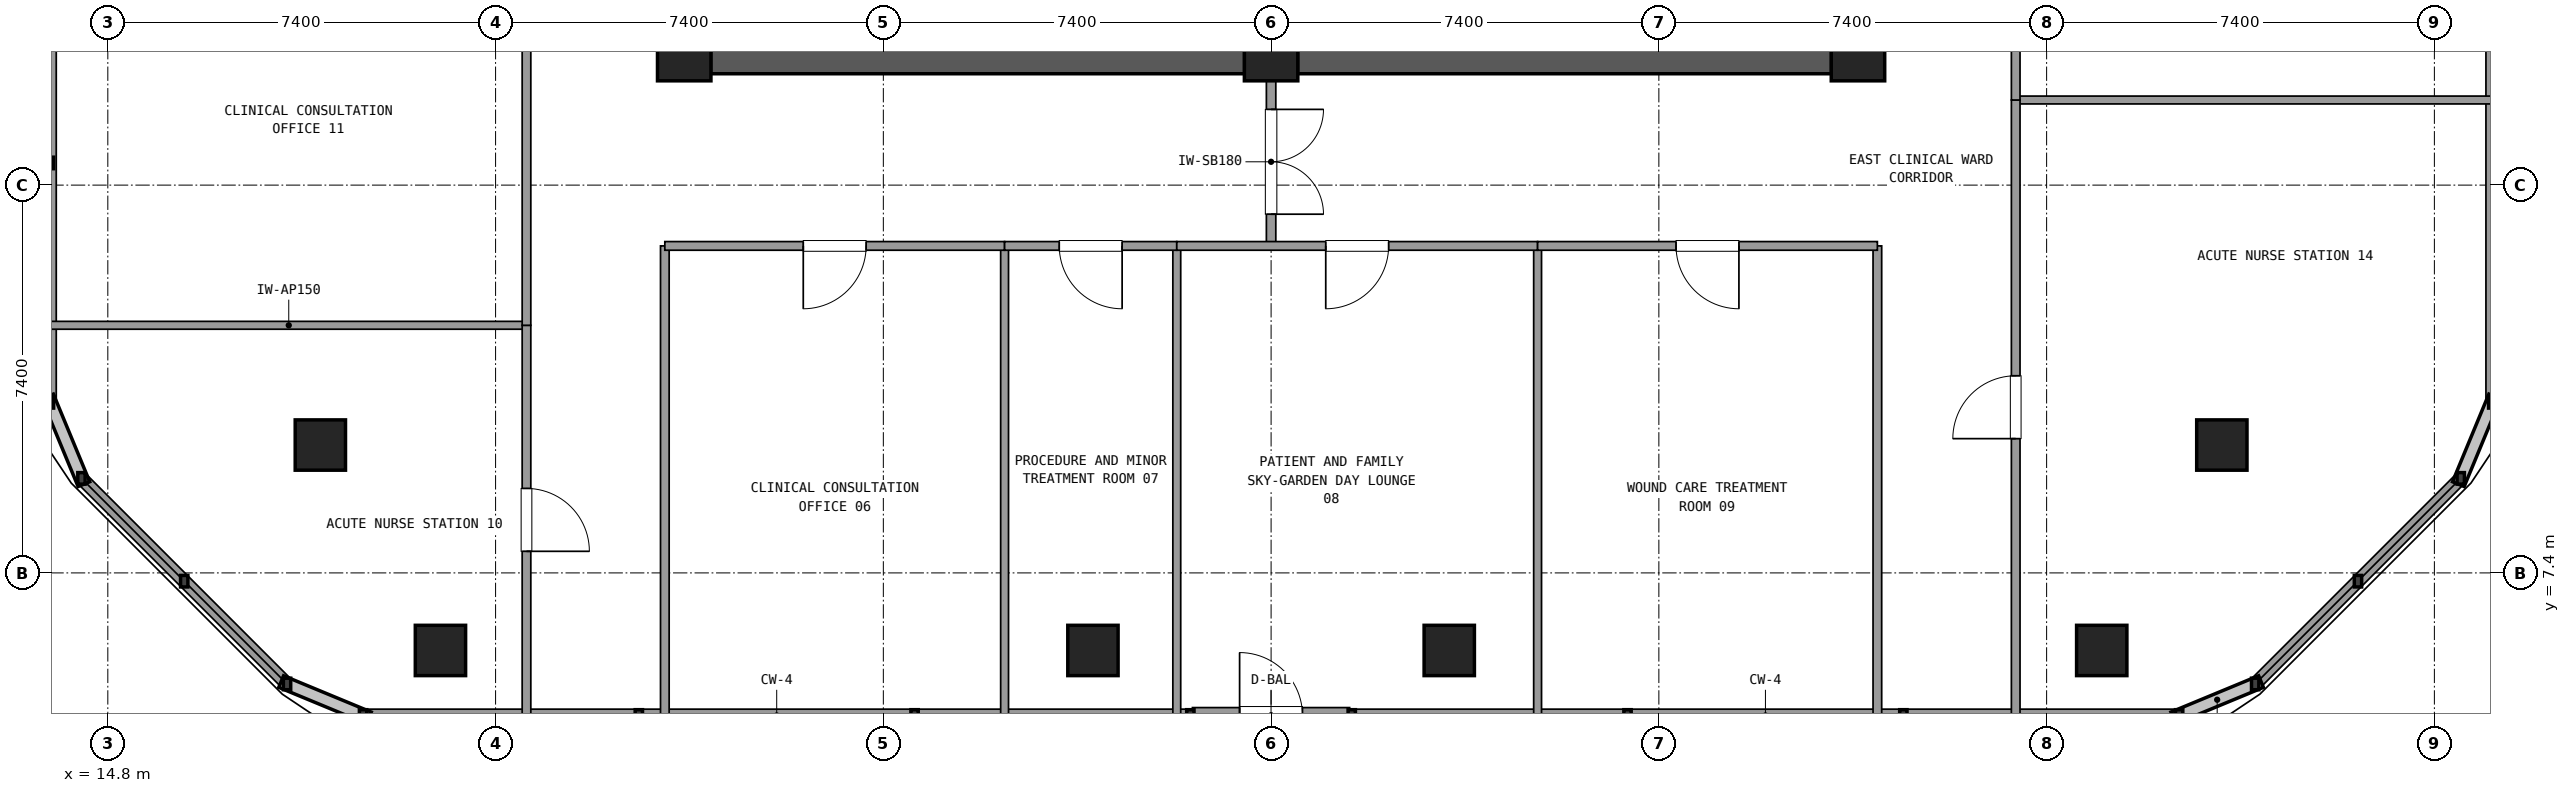
"""IFC4 building model, lengths in metres.
Left out: names, types, materials, properties, quantities, classifications, styles, units other than length and angle.
Written with IfcOpenShell. Run it as: python <this file> out.ifc"""

import sys

from ifc_helpers import new_model, si_unit, direction, frame, frame_2d, origin, origin_2d, place, context, subcontext, project, spatial, rectangle, extrude, element, fill, save


model = new_model("IFC4")
c1 = context("Model", 3, precision=1e-05, world=origin(), true_north=direction((0.0, 1.0)))
c2 = subcontext(c1, "Body", "Model", "MODEL_VIEW")
j1 = project(units=[si_unit("LENGTHUNIT", "METRE"), si_unit("PLANEANGLEUNIT", "RADIAN")], contexts=[c1])
p1 = place(None, origin())
s1 = spatial("IfcSite", under=j1, at=p1, CompositionType="ELEMENT")
p2 = place(p1, origin())
s2 = spatial("IfcBuilding", under=s1, at=p2, CompositionType="ELEMENT")
p3 = place(p2, frame((0.0, 0.0, 134.82)))
s3 = spatial("IfcBuildingStorey", under=s2, at=p3, CompositionType="ELEMENT", Elevation=134.82)
for number, where, z_axis, x_axis in (
    (1, (25.8, 17.3, 0.0), (0.0, 0.0, 1.0), (1.0, 0.0, 0.0)),
    (2, (37.0, 17.3, 0.0), (0.0, 0.0, 1.0), (1.0, 0.0, 0.0)),
    (3, (48.2, 17.3, 0.0), (0.0, 0.0, 1.0), (1.0, 0.0, 0.0)),
):
    element("IfcColumn", number, at=place(p3, frame(where, z_axis=z_axis, x_axis=x_axis)), inside=s3, PredefinedType="COLUMN", context=c2, shape_type="SweptSolid", body=[
        extrude(rectangle(XDim=1.02, YDim=1.02, at=origin_2d()), origin(), (0.0, 0.0, 1.0), 3.6),
    ])
for number, where, z_axis, x_axis in (
    (4, (26.305, 17.3, 0.0), (0.0, 0.0, 1.0), (1.0, 0.0, 0.0)),
    (5, (37.505, 17.3, 0.0), (0.0, 0.0, 1.0), (1.0, 0.0, 0.0)),
):
    element("IfcWall", number, at=place(p3, frame(where, z_axis=z_axis, x_axis=x_axis)), inside=s3, PredefinedType="SHEAR", context=c2, shape_type="SweptSolid", body=[
        extrude(rectangle(XDim=10.19, YDim=0.75, at=frame_2d((5.095, 0.0))), origin(), (0.0, 0.0, 1.0), 3.32),
    ])
for number, where, z_axis, x_axis in (
    (6, (18.856, 9.84, 0.0), (0.0, 0.0, 1.0), (1.0, 0.0, 0.0)),
    (7, (21.148, 5.92, 0.0), (0.0, 0.0, 1.0), (1.0, 0.0, 0.0)),
    (8, (33.6, 5.92, 0.0), (0.0, 0.0, 1.0), (1.0, 0.0, 0.0)),
    (9, (40.4, 5.92, 0.0), (0.0, 0.0, 1.0), (1.0, 0.0, 0.0)),
    (10, (52.852, 5.92, 0.0), (0.0, 0.0, 1.0), (1.0, 0.0, 0.0)),
    (11, (55.144, 9.84, 0.0), (0.0, 0.0, 1.0), (1.0, 0.0, 0.0)),
):
    element("IfcColumn", number, at=place(p3, frame(where, z_axis=z_axis, x_axis=x_axis)), inside=s3, PredefinedType="COLUMN", context=c2, shape_type="SweptSolid", body=[
        extrude(rectangle(XDim=0.96, YDim=0.96, at=origin_2d()), origin(), (0.0, 0.0, 1.0), 3.6),
    ])
p4 = place(p3, frame((35.499, 4.68, 0.0), z_axis=(0.0, 0.0, 1.0), x_axis=(1.0, 0.0, 0.0)))
e12 = element("IfcWall", 12, at=p4, inside=s3, PredefinedType="SOLIDWALL", context=c2, shape_type="SweptSolid", body=[
    extrude(rectangle(XDim=3.0, YDim=0.3, at=frame_2d((1.5, 0.0))), origin(), (0.0, 0.0, 1.0), 2.67),
])
p5 = place(p4, frame((0.9, 0.0, 0.0)))
e13 = element("IfcOpeningElement", 13, at=p5, cuts=e12, PredefinedType="OPENING", context=c2, shape_type="SweptSolid", body=[
    extrude(rectangle(XDim=1.2, YDim=2.2, at=frame_2d((0.6, 1.1))), frame((0.0, 0.16, 0.0), z_axis=(0.0, -1.0, 0.0), x_axis=(1.0, 0.0, 0.0)), (0.0, 0.0, 1.0), 0.32),
])
p6 = place(p3, frame((19.671, 4.68, 0.0), z_axis=(0.0, 0.0, 1.0), x_axis=(1.0, 0.0, 0.0)))
e14 = element("IfcWall", 14, at=p6, inside=s3, PredefinedType="SOLIDWALL", context=c2, shape_type="SweptSolid", body=[
    extrude(rectangle(XDim=15.788, YDim=0.24, at=frame_2d((7.894, 0.0))), origin(), (0.0, 0.0, 1.0), 0.85),
])
p7 = place(p3, frame((38.539, 4.68, 0.0), z_axis=(0.0, 0.0, 1.0), x_axis=(1.0, 0.0, 0.0)))
e15 = element("IfcWall", 15, at=p7, inside=s3, PredefinedType="SOLIDWALL", context=c2, shape_type="SweptSolid", body=[
    extrude(rectangle(XDim=15.79, YDim=0.24, at=frame_2d((7.895, 0.0))), origin(), (0.0, 0.0, 1.0), 0.85),
])
p8 = place(p3, frame((55.78, 5.281, 0.0), z_axis=(0.0, 0.0, 1.0), x_axis=(0.707084777957, 0.707128783731, 0.0)))
e16 = element("IfcWall", 16, at=p8, inside=s3, PredefinedType="SOLIDWALL", context=c2, shape_type="SweptSolid", body=[
    extrude(rectangle(XDim=5.548, YDim=0.24, at=frame_2d((2.774, 0.0))), origin(), (0.0, 0.0, 1.0), 0.85),
])
p9 = place(p3, frame((60.304, 10.655, 0.0), z_axis=(0.0, 0.0, 1.0), x_axis=(0.0, 1.0, 0.0)))
e17 = element("IfcWall", 17, at=p9, inside=s3, PredefinedType="SOLIDWALL", context=c2, shape_type="SweptSolid", body=[
    extrude(rectangle(XDim=30.49, YDim=0.24, at=frame_2d((15.245, 0.0))), origin(), (0.0, 0.0, 1.0), 0.85),
])
p10 = place(p3, frame((13.696, 24.36, 0.0), z_axis=(0.0, 0.0, 1.0), x_axis=(0.0, -1.0, 0.0)))
e18 = element("IfcWall", 18, at=p10, inside=s3, PredefinedType="SOLIDWALL", context=c2, shape_type="SweptSolid", body=[
    extrude(rectangle(XDim=13.705, YDim=0.24, at=frame_2d((6.853, 0.0))), origin(), (0.0, 0.0, 1.0), 0.85),
])
p11 = place(p3, frame((14.297, 9.204, 0.0), z_axis=(0.0, 0.0, 1.0), x_axis=(0.707084777957, -0.707128783731, 0.0)))
e19 = element("IfcWall", 19, at=p11, inside=s3, PredefinedType="SOLIDWALL", context=c2, shape_type="SweptSolid", body=[
    extrude(rectangle(XDim=5.548, YDim=0.24, at=frame_2d((2.774, 0.0))), origin(), (0.0, 0.0, 1.0), 0.85),
])
p12 = place(p3, frame((37.0, 13.64, 0.0), z_axis=(0.0, 0.0, 1.0), x_axis=(0.0, 1.0, 0.0)))
e20 = element("IfcWall", 20, at=p12, inside=s3, PredefinedType="PARTITIONING", context=c2, shape_type="SweptSolid", body=[
    extrude(rectangle(XDim=3.21, YDim=0.18, at=frame_2d((1.605, 0.0))), origin(), (0.0, 0.0, 1.0), 2.61),
])
p13 = place(p12, frame((0.605, 0.0, 0.0)))
e21 = element("IfcOpeningElement", 21, at=p13, cuts=e20, PredefinedType="OPENING", context=c2, shape_type="SweptSolid", body=[
    extrude(rectangle(XDim=2.0, YDim=2.2, at=frame_2d((1.0, 1.1))), frame((0.0, 0.1, 0.0), z_axis=(0.0, -1.0, 0.0), x_axis=(1.0, 0.0, 0.0)), (0.0, 0.0, 1.0), 0.2),
])
for number, where, z_axis, x_axis in (
    (22, (25.43, 4.7, 0.0), (0.0, 0.0, 1.0), (0.0, 1.0, 0.0)),
    (23, (48.57, 4.7, 0.0), (0.0, 0.0, 1.0), (0.0, 1.0, 0.0)),
):
    element("IfcWall", number, at=place(p3, frame(where, z_axis=z_axis, x_axis=x_axis)), inside=s3, PredefinedType="PARTITIONING", context=c2, shape_type="SweptSolid", body=[
        extrude(rectangle(XDim=8.94, YDim=0.165, at=frame_2d((4.47, 0.0))), origin(), (0.0, 0.0, 1.0), 2.61),
    ])
p14 = place(p3, frame((31.914, 13.64, 0.0), z_axis=(0.0, 0.0, 1.0), x_axis=(0.0, -1.0, 0.0)))
e24 = element("IfcWall", 24, at=p14, inside=s3, PredefinedType="PARTITIONING", context=c2, shape_type="SweptSolid", body=[
    extrude(rectangle(XDim=8.94, YDim=0.15, at=frame_2d((4.47, 0.0))), origin(), (0.0, 0.0, 1.0), 2.61),
])
p15 = place(p3, frame((25.43, 13.64, 0.0), z_axis=(0.0, 0.0, 1.0), x_axis=(1.0, 0.0, 0.0)))
e25 = element("IfcWall", 25, at=p15, inside=s3, PredefinedType="PARTITIONING", context=c2, shape_type="SweptSolid", body=[
    extrude(rectangle(XDim=6.484, YDim=0.165, at=frame_2d((3.242, 0.0))), origin(), (0.0, 0.0, 1.0), 2.61),
])
p16 = place(p15, frame((2.642, 0.0, 0.0)))
e26 = element("IfcOpeningElement", 26, at=p16, cuts=e25, PredefinedType="OPENING", context=c2, shape_type="SweptSolid", body=[
    extrude(rectangle(XDim=1.2, YDim=2.15, at=frame_2d((0.6, 1.075))), frame((0.0, 0.093, 0.0), z_axis=(0.0, -1.0, 0.0), x_axis=(1.0, 0.0, 0.0)), (0.0, 0.0, 1.0), 0.185),
])
p17 = place(p3, frame((35.2, 13.64, 0.0), z_axis=(0.0, 0.0, 1.0), x_axis=(0.0, -1.0, 0.0)))
e27 = element("IfcWall", 27, at=p17, inside=s3, PredefinedType="PARTITIONING", context=c2, shape_type="SweptSolid", body=[
    extrude(rectangle(XDim=8.94, YDim=0.15, at=frame_2d((4.47, 0.0))), origin(), (0.0, 0.0, 1.0), 2.61),
])
p18 = place(p3, frame((31.914, 13.64, 0.0), z_axis=(0.0, 0.0, 1.0), x_axis=(1.0, 0.0, 0.0)))
e28 = element("IfcWall", 28, at=p18, inside=s3, PredefinedType="PARTITIONING", context=c2, shape_type="SweptSolid", body=[
    extrude(rectangle(XDim=3.286, YDim=0.165, at=frame_2d((1.643, 0.0))), origin(), (0.0, 0.0, 1.0), 2.61),
])
p19 = place(p18, frame((1.043, 0.0, 0.0)))
e29 = element("IfcOpeningElement", 29, at=p19, cuts=e28, PredefinedType="OPENING", context=c2, shape_type="SweptSolid", body=[
    extrude(rectangle(XDim=1.2, YDim=2.15, at=frame_2d((0.6, 1.075))), frame((0.0, 0.093, 0.0), z_axis=(0.0, -1.0, 0.0), x_axis=(1.0, 0.0, 0.0)), (0.0, 0.0, 1.0), 0.185),
])
p20 = place(p3, frame((42.086, 13.64, 0.0), z_axis=(0.0, 0.0, 1.0), x_axis=(0.0, -1.0, 0.0)))
e30 = element("IfcWall", 30, at=p20, inside=s3, PredefinedType="PARTITIONING", context=c2, shape_type="SweptSolid", body=[
    extrude(rectangle(XDim=8.94, YDim=0.15, at=frame_2d((4.47, 0.0))), origin(), (0.0, 0.0, 1.0), 2.61),
])
p21 = place(p3, frame((35.2, 13.64, 0.0), z_axis=(0.0, 0.0, 1.0), x_axis=(1.0, 0.0, 0.0)))
e31 = element("IfcWall", 31, at=p21, inside=s3, PredefinedType="PARTITIONING", context=c2, shape_type="SweptSolid", body=[
    extrude(rectangle(XDim=6.886, YDim=0.165, at=frame_2d((3.443, 0.0))), origin(), (0.0, 0.0, 1.0), 2.61),
])
p22 = place(p21, frame((2.843, 0.0, 0.0)))
e32 = element("IfcOpeningElement", 32, at=p22, cuts=e31, PredefinedType="OPENING", context=c2, shape_type="SweptSolid", body=[
    extrude(rectangle(XDim=1.2, YDim=2.15, at=frame_2d((0.6, 1.075))), frame((0.0, 0.093, 0.0), z_axis=(0.0, -1.0, 0.0), x_axis=(1.0, 0.0, 0.0)), (0.0, 0.0, 1.0), 0.185),
])
p23 = place(p3, frame((42.086, 13.64, 0.0), z_axis=(0.0, 0.0, 1.0), x_axis=(1.0, 0.0, 0.0)))
e33 = element("IfcWall", 33, at=p23, inside=s3, PredefinedType="PARTITIONING", context=c2, shape_type="SweptSolid", body=[
    extrude(rectangle(XDim=6.484, YDim=0.165, at=frame_2d((3.242, 0.0))), origin(), (0.0, 0.0, 1.0), 2.61),
])
p24 = place(p23, frame((2.642, 0.0, 0.0)))
e34 = element("IfcOpeningElement", 34, at=p24, cuts=e33, PredefinedType="OPENING", context=c2, shape_type="SweptSolid", body=[
    extrude(rectangle(XDim=1.2, YDim=2.15, at=frame_2d((0.6, 1.075))), frame((0.0, 0.093, 0.0), z_axis=(0.0, -1.0, 0.0), x_axis=(1.0, 0.0, 0.0)), (0.0, 0.0, 1.0), 0.185),
])
p25 = place(p3, frame((22.79, 12.125, 0.0), z_axis=(0.0, 0.0, 1.0), x_axis=(-1.0, 0.0, 0.0)))
e35 = element("IfcWall", 35, at=p25, inside=s3, PredefinedType="PARTITIONING", context=c2, shape_type="SweptSolid", body=[
    extrude(rectangle(XDim=9.074, YDim=0.15, at=frame_2d((4.537, 0.0))), origin(), (0.0, 0.0, 1.0), 2.61),
])
p26 = place(p3, frame((22.79, 4.7, 0.0), z_axis=(0.0, 0.0, 1.0), x_axis=(0.0, 1.0, 0.0)))
e36 = element("IfcWall", 36, at=p26, inside=s3, PredefinedType="PARTITIONING", context=c2, shape_type="SweptSolid", body=[
    extrude(rectangle(XDim=7.425, YDim=0.165, at=frame_2d((3.712, 0.0))), origin(), (0.0, 0.0, 1.0), 2.61),
])
p27 = place(p26, frame((3.112, 0.0, 0.0)))
e37 = element("IfcOpeningElement", 37, at=p27, cuts=e36, PredefinedType="OPENING", context=c2, shape_type="SweptSolid", body=[
    extrude(rectangle(XDim=1.2, YDim=2.15, at=frame_2d((0.6, 1.075))), frame((0.0, 0.093, 0.0), z_axis=(0.0, -1.0, 0.0), x_axis=(1.0, 0.0, 0.0)), (0.0, 0.0, 1.0), 0.185),
])
p28 = place(p3, frame((22.79, 12.125, 0.0), z_axis=(0.0, 0.0, 1.0), x_axis=(0.0, 1.0, 0.0)))
e38 = element("IfcWall", 38, at=p28, inside=s3, PredefinedType="PARTITIONING", context=c2, shape_type="SweptSolid", body=[
    extrude(rectangle(XDim=12.115, YDim=0.165, at=frame_2d((6.058, 0.0))), origin(), (0.0, 0.0, 1.0), 2.61),
])
p29 = place(p28, frame((5.457, 0.0, 0.0)))
e39 = element("IfcOpeningElement", 39, at=p29, cuts=e38, PredefinedType="OPENING", context=c2, shape_type="SweptSolid", body=[
    extrude(rectangle(XDim=1.2, YDim=2.15, at=frame_2d((0.6, 1.075))), frame((0.0, 0.093, 0.0), z_axis=(0.0, -1.0, 0.0), x_axis=(1.0, 0.0, 0.0)), (0.0, 0.0, 1.0), 0.185),
])
p30 = place(p3, frame((51.21, 16.424, 0.0), z_axis=(0.0, 0.0, 1.0), x_axis=(1.0, 0.0, 0.0)))
e40 = element("IfcWall", 40, at=p30, inside=s3, PredefinedType="PARTITIONING", context=c2, shape_type="SweptSolid", body=[
    extrude(rectangle(XDim=9.074, YDim=0.15, at=frame_2d((4.537, 0.0))), origin(), (0.0, 0.0, 1.0), 2.61),
])
p31 = place(p3, frame((51.21, 4.7, 0.0), z_axis=(0.0, 0.0, 1.0), x_axis=(0.0, 1.0, 0.0)))
e41 = element("IfcWall", 41, at=p31, inside=s3, PredefinedType="PARTITIONING", context=c2, shape_type="SweptSolid", body=[
    extrude(rectangle(XDim=11.724, YDim=0.165, at=frame_2d((5.862, 0.0))), origin(), (0.0, 0.0, 1.0), 2.61),
])
p32 = place(p31, frame((5.262, 0.0, 0.0)))
e42 = element("IfcOpeningElement", 42, at=p32, cuts=e41, PredefinedType="OPENING", context=c2, shape_type="SweptSolid", body=[
    extrude(rectangle(XDim=1.2, YDim=2.15, at=frame_2d((0.6, 1.075))), frame((0.0, 0.093, 0.0), z_axis=(0.0, -1.0, 0.0), x_axis=(1.0, 0.0, 0.0)), (0.0, 0.0, 1.0), 0.185),
])
p33 = place(p3, frame((51.21, 16.424, 0.0), z_axis=(0.0, 0.0, 1.0), x_axis=(0.0, 1.0, 0.0)))
e43 = element("IfcWall", 43, at=p33, inside=s3, PredefinedType="PARTITIONING", context=c2, shape_type="SweptSolid", body=[
    extrude(rectangle(XDim=7.816, YDim=0.165, at=frame_2d((3.908, 0.0))), origin(), (0.0, 0.0, 1.0), 2.61),
])
p34 = place(p33, frame((3.308, 0.0, 0.0)))
e44 = element("IfcOpeningElement", 44, at=p34, cuts=e43, PredefinedType="OPENING", context=c2, shape_type="SweptSolid", body=[
    extrude(rectangle(XDim=1.2, YDim=2.15, at=frame_2d((0.6, 1.075))), frame((0.0, 0.093, 0.0), z_axis=(0.0, -1.0, 0.0), x_axis=(1.0, 0.0, 0.0)), (0.0, 0.0, 1.0), 0.185),
])
p35 = place(p13, frame((2.0, 0.0, 0.0), z_axis=(0.0, 0.0, 1.0), x_axis=(-1.0, 0.0, 0.0)))
e45 = element("IfcDoor", 45, at=p35, inside=s3, OperationType="DOUBLE_DOOR_SINGLE_SWING", PredefinedType="DOOR", context=c2, shape_type="SweptSolid", body=[
    extrude(rectangle(XDim=2.0, YDim=2.2, at=frame_2d((1.0, 1.1))), frame((0.0, 0.025, 0.0), z_axis=(0.0, -1.0, 0.0), x_axis=(1.0, 0.0, 0.0)), (0.0, 0.0, 1.0), 0.05),
])
fill(e21, e45)
p36 = place(p16, frame((1.2, 0.0, 0.0), z_axis=(0.0, 0.0, 1.0), x_axis=(-1.0, 0.0, 0.0)))
e46 = element("IfcDoor", 46, at=p36, inside=s3, OperationType="SINGLE_SWING_LEFT", PredefinedType="DOOR", context=c2, shape_type="SweptSolid", body=[
    extrude(rectangle(XDim=1.2, YDim=2.15, at=frame_2d((0.6, 1.075))), frame((0.0, 0.025, 0.0), z_axis=(0.0, -1.0, 0.0), x_axis=(1.0, 0.0, 0.0)), (0.0, 0.0, 1.0), 0.05),
])
fill(e26, e46)
p37 = place(p19, frame((1.2, 0.0, 0.0), z_axis=(0.0, 0.0, 1.0), x_axis=(-1.0, 0.0, 0.0)))
e47 = element("IfcDoor", 47, at=p37, inside=s3, OperationType="SINGLE_SWING_RIGHT", PredefinedType="DOOR", context=c2, shape_type="SweptSolid", body=[
    extrude(rectangle(XDim=1.2, YDim=2.15, at=frame_2d((0.6, 1.075))), frame((0.0, 0.025, 0.0), z_axis=(0.0, -1.0, 0.0), x_axis=(1.0, 0.0, 0.0)), (0.0, 0.0, 1.0), 0.05),
])
fill(e29, e47)
p38 = place(p22, frame((1.2, 0.0, 0.0), z_axis=(0.0, 0.0, 1.0), x_axis=(-1.0, 0.0, 0.0)))
e48 = element("IfcDoor", 48, at=p38, inside=s3, OperationType="SINGLE_SWING_LEFT", PredefinedType="DOOR", context=c2, shape_type="SweptSolid", body=[
    extrude(rectangle(XDim=1.2, YDim=2.15, at=frame_2d((0.6, 1.075))), frame((0.0, 0.025, 0.0), z_axis=(0.0, -1.0, 0.0), x_axis=(1.0, 0.0, 0.0)), (0.0, 0.0, 1.0), 0.05),
])
fill(e32, e48)
p39 = place(p24, frame((1.2, 0.0, 0.0), z_axis=(0.0, 0.0, 1.0), x_axis=(-1.0, 0.0, 0.0)))
e49 = element("IfcDoor", 49, at=p39, inside=s3, OperationType="SINGLE_SWING_RIGHT", PredefinedType="DOOR", context=c2, shape_type="SweptSolid", body=[
    extrude(rectangle(XDim=1.2, YDim=2.15, at=frame_2d((0.6, 1.075))), frame((0.0, 0.025, 0.0), z_axis=(0.0, -1.0, 0.0), x_axis=(1.0, 0.0, 0.0)), (0.0, 0.0, 1.0), 0.05),
])
fill(e34, e49)
p40 = place(p27, frame((1.2, 0.0, 0.0), z_axis=(0.0, 0.0, 1.0), x_axis=(-1.0, 0.0, 0.0)))
e50 = element("IfcDoor", 50, at=p40, inside=s3, OperationType="SINGLE_SWING_LEFT", PredefinedType="DOOR", context=c2, shape_type="SweptSolid", body=[
    extrude(rectangle(XDim=1.2, YDim=2.15, at=frame_2d((0.6, 1.075))), frame((0.0, 0.025, 0.0), z_axis=(0.0, -1.0, 0.0), x_axis=(1.0, 0.0, 0.0)), (0.0, 0.0, 1.0), 0.05),
])
fill(e37, e50)
p41 = place(p32, origin())
e51 = element("IfcDoor", 51, at=p41, inside=s3, OperationType="SINGLE_SWING_LEFT", PredefinedType="DOOR", context=c2, shape_type="SweptSolid", body=[
    extrude(rectangle(XDim=1.2, YDim=2.15, at=frame_2d((0.6, 1.075))), frame((0.0, 0.025, 0.0), z_axis=(0.0, -1.0, 0.0), x_axis=(1.0, 0.0, 0.0)), (0.0, 0.0, 1.0), 0.05),
])
fill(e42, e51)
save(model, sys.argv[1])
